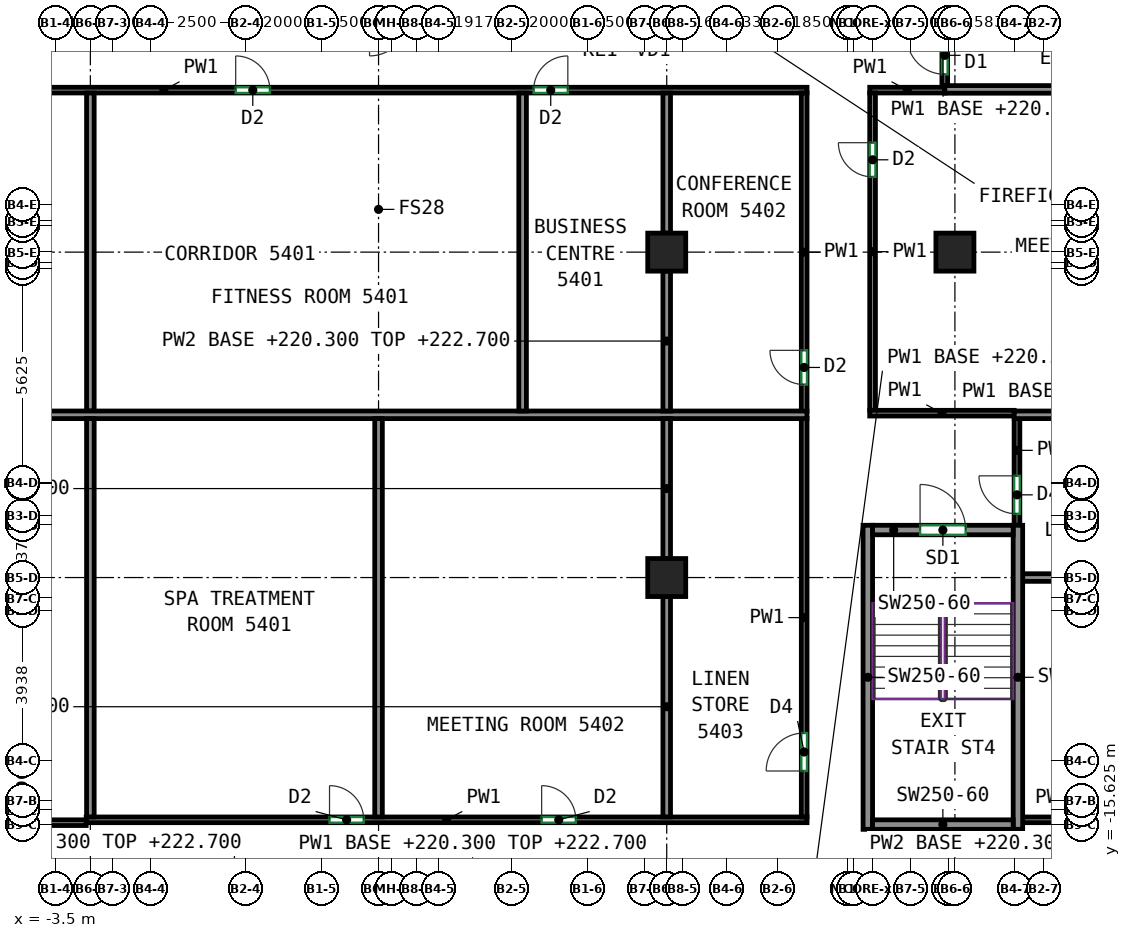
"""IFC4 building model, lengths in metres.
Left out: names, types, materials, properties, quantities, classifications, styles, units other than length and angle.
Written with IfcOpenShell. Run it as: python <this file> out.ifc"""

import sys

from ifc_helpers import new_model, si_unit, direction, frame, frame_2d, origin, origin_2d, place, context, subcontext, project, spatial, rectangle, extrude, source, transform, mapped, element, fill, save


model = new_model("IFC4")
c1 = context("Model", 3, precision=1e-05, world=origin(), true_north=direction((0.0, 1.0)))
c2 = subcontext(c1, "Body", "Model", "MODEL_VIEW")
j1 = project(units=[si_unit("LENGTHUNIT", "METRE"), si_unit("PLANEANGLEUNIT", "RADIAN")], contexts=[c1])
p1 = place(None, origin())
s1 = spatial("IfcSite", under=j1, at=p1, CompositionType="ELEMENT")
p2 = place(p1, origin())
s2 = spatial("IfcBuilding", under=s1, at=p2, CompositionType="ELEMENT")
p3 = place(p2, frame((0.0, 0.0, 220.3)))
s3 = spatial("IfcBuildingStorey", under=s2, at=p3, CompositionType="ELEMENT", Elevation=220.3)
m1 = source(origin(), c2, "Body", "SweptSolid", [
    extrude(rectangle(XDim=1.0, YDim=1.0, at=origin_2d()), origin(), (0.0, 0.0, 1.0), 3.0),
])
for number, where, z_axis, x_axis in (
    (1, (12.583, -9.125, 0.0), (0.0, 0.0, 1.0), (1.0, 0.0, 0.0)),
    (2, (12.583, -0.562, 0.0), (0.0, 0.0, 1.0), (1.0, 0.0, 0.0)),
    (3, (20.167, -0.562, 0.0), (0.0, 0.0, 1.0), (1.0, 0.0, 0.0)),
):
    element("IfcColumn", number, at=place(p3, frame(where, z_axis=z_axis, x_axis=x_axis)), inside=s3, PredefinedType="COLUMN", context=c2, shape_type="MappedRepresentation", body=[
        mapped(m1, transform((0.0, 0.0, 0.0))),
    ])
m2 = source(origin(), c2, "Body", "SweptSolid", [
    extrude(rectangle(XDim=8.0, YDim=0.25, at=frame_2d((4.0, 0.0))), origin(), (0.0, 0.0, 1.0), 3.0),
])
for number, where, z_axis, x_axis in (
    (4, (17.875, -15.75, 0.0), (0.0, 0.0, 1.0), (0.0, 1.0, 0.0)),
    (5, (21.825, -15.75, 0.0), (0.0, 0.0, 1.0), (0.0, 1.0, 0.0)),
):
    element("IfcWall", number, at=place(p3, frame(where, z_axis=z_axis, x_axis=x_axis)), inside=s3, PredefinedType="SHEAR", context=c2, shape_type="MappedRepresentation", body=[
        mapped(m2, transform((0.0, 0.0, 0.0))),
    ])
m3 = source(origin(), c2, "Body", "SweptSolid", [
    extrude(rectangle(XDim=3.7, YDim=0.25, at=frame_2d((1.85, 0.0))), origin(), (0.0, 0.0, 1.0), 3.0),
])
p4 = place(p3, frame((18.0, -15.625, 0.0), z_axis=(0.0, 0.0, 1.0), x_axis=(1.0, 0.0, 0.0)))
e6 = element("IfcWall", 6, at=p4, inside=s3, PredefinedType="SHEAR", context=c2, shape_type="MappedRepresentation", body=[
    mapped(m3, transform((0.0, 0.0, 0.0))),
])
p5 = place(p3, frame((18.0, -7.875, 0.0), z_axis=(0.0, 0.0, 1.0), x_axis=(1.0, 0.0, 0.0)))
e7 = element("IfcWall", 7, at=p5, inside=s3, PredefinedType="SHEAR", context=c2, shape_type="MappedRepresentation", body=[
    mapped(m3, transform((0.0, 0.0, 0.0))),
])
p6 = place(p5, frame((1.25, 0.0, 0.0)))
e8 = element("IfcOpeningElement", 8, at=p6, cuts=e7, PredefinedType="OPENING", context=c2, shape_type="SweptSolid", body=[
    extrude(rectangle(XDim=1.2, YDim=2.1, at=frame_2d((0.6, 1.05))), frame((0.0, 0.135, 0.0), z_axis=(0.0, -1.0, 0.0), x_axis=(1.0, 0.0, 0.0)), (0.0, 0.0, 1.0), 0.27),
])
p7 = place(p3, frame((19.9, 3.809, 0.0), z_axis=(0.0, 0.0, 1.0), x_axis=(0.0, 1.0, 0.0)))
e9 = element("IfcWall", 9, at=p7, inside=s3, PredefinedType="PARTITIONING", context=c2, shape_type="SweptSolid", body=[
    extrude(rectangle(XDim=2.151, YDim=0.15, at=frame_2d((1.075, 0.0))), origin(), (0.0, 0.0, 1.0), 2.4),
])
p8 = place(p7, frame((0.307, 0.0, 0.0)))
e10 = element("IfcOpeningElement", 10, at=p8, cuts=e9, PredefinedType="OPENING", context=c2, shape_type="SweptSolid", body=[
    extrude(rectangle(XDim=1.0, YDim=2.1, at=frame_2d((0.5, 1.05))), frame((0.0, 0.085, 0.0), z_axis=(0.0, -1.0, 0.0), x_axis=(1.0, 0.0, 0.0)), (0.0, 0.0, 1.0), 0.17),
])
p9 = place(p3, frame((17.925, 3.7, 0.0), z_axis=(0.0, 0.0, 1.0), x_axis=(1.0, 0.0, 0.0)))
e11 = element("IfcWall", 11, at=p9, inside=s3, PredefinedType="PARTITIONING", context=c2, shape_type="SweptSolid", body=[
    extrude(rectangle(XDim=1.975, YDim=0.15, at=frame_2d((0.987, 0.0))), origin(), (0.0, 0.0, 1.0), 3.0),
])
p10 = place(p3, frame((18.0, -4.725, 0.0), z_axis=(0.0, 0.0, 1.0), x_axis=(0.0, 1.0, 0.0)))
e12 = element("IfcWall", 12, at=p10, inside=s3, PredefinedType="PARTITIONING", context=c2, shape_type="SweptSolid", body=[
    extrude(rectangle(XDim=8.35, YDim=0.15, at=frame_2d((4.175, 0.0))), origin(), (0.0, 0.0, 1.0), 3.0),
])
p11 = place(p10, frame((6.142, 0.0, 0.0)))
e13 = element("IfcOpeningElement", 13, at=p11, cuts=e12, PredefinedType="OPENING", context=c2, shape_type="SweptSolid", body=[
    extrude(rectangle(XDim=0.9, YDim=2.1, at=frame_2d((0.45, 1.05))), frame((0.0, 0.085, 0.0), z_axis=(0.0, -1.0, 0.0), x_axis=(1.0, 0.0, 0.0)), (0.0, 0.0, 1.0), 0.17),
])
p12 = place(p3, frame((17.925, -4.8, 0.0), z_axis=(0.0, 0.0, 1.0), x_axis=(1.0, 0.0, 0.0)))
e14 = element("IfcWall", 14, at=p12, inside=s3, PredefinedType="PARTITIONING", context=c2, shape_type="SweptSolid", body=[
    extrude(rectangle(XDim=3.802, YDim=0.15, at=frame_2d((1.901, 0.0))), origin(), (0.0, 0.0, 1.0), 3.0),
])
p13 = place(p3, frame((21.8, -7.75, 0.0), z_axis=(0.0, 0.0, 1.0), x_axis=(0.0, 1.0, 0.0)))
e15 = element("IfcWall", 15, at=p13, inside=s3, PredefinedType="PARTITIONING", context=c2, shape_type="SweptSolid", body=[
    extrude(rectangle(XDim=2.817, YDim=0.15, at=frame_2d((1.408, 0.0))), origin(), (0.0, 0.0, 1.0), 3.0),
])
p14 = place(p13, frame((0.301, 0.0, 0.0)))
e16 = element("IfcOpeningElement", 16, at=p14, cuts=e15, PredefinedType="OPENING", context=c2, shape_type="SweptSolid", body=[
    extrude(rectangle(XDim=1.0, YDim=2.1, at=frame_2d((0.5, 1.05))), frame((0.0, 0.085, 0.0), z_axis=(0.0, -1.0, 0.0), x_axis=(1.0, 0.0, 0.0)), (0.0, 0.0, 1.0), 0.17),
])
p15 = place(p3, frame((21.95, -15.5, 0.0), z_axis=(0.0, 0.0, 1.0), x_axis=(1.0, 0.0, 0.0)))
e17 = element("IfcWall", 17, at=p15, inside=s3, PredefinedType="PARTITIONING", context=c2, shape_type="SweptSolid", body=[
    extrude(rectangle(XDim=5.875, YDim=0.15, at=frame_2d((2.938, 0.0))), origin(), (0.0, 0.0, 1.0), 3.0),
])
p16 = place(p15, frame((2.437, 0.0, 0.0)))
e18 = element("IfcOpeningElement", 18, at=p16, cuts=e17, PredefinedType="OPENING", context=c2, shape_type="SweptSolid", body=[
    extrude(rectangle(XDim=0.9, YDim=2.1, at=frame_2d((0.45, 1.05))), frame((0.0, 0.085, 0.0), z_axis=(0.0, -1.0, 0.0), x_axis=(1.0, 0.0, 0.0)), (0.0, 0.0, 1.0), 0.17),
])
p17 = place(p3, frame((-17.575, 3.7, 0.0), z_axis=(0.0, 0.0, 1.0), x_axis=(1.0, 0.0, 0.0)))
e19 = element("IfcWall", 19, at=p17, inside=s3, PredefinedType="PARTITIONING", context=c2, shape_type="SweptSolid", body=[
    extrude(rectangle(XDim=33.85, YDim=0.15, at=frame_2d((16.925, 0.0))), origin(), (0.0, 0.0, 1.0), 3.0),
])
p18 = place(p17, frame((4.301, 0.0, 0.0)))
e20 = element("IfcOpeningElement", 20, at=p18, cuts=e19, PredefinedType="OPENING", context=c2, shape_type="SweptSolid", body=[
    extrude(rectangle(XDim=0.9, YDim=2.1, at=frame_2d((0.45, 1.05))), frame((0.0, 0.085, 0.0), z_axis=(0.0, -1.0, 0.0), x_axis=(1.0, 0.0, 0.0)), (0.0, 0.0, 1.0), 0.17),
])
p19 = place(p17, frame((18.816, 0.0, 0.0)))
e21 = element("IfcOpeningElement", 21, at=p19, cuts=e19, PredefinedType="OPENING", context=c2, shape_type="SweptSolid", body=[
    extrude(rectangle(XDim=0.9, YDim=2.1, at=frame_2d((0.45, 1.05))), frame((0.0, 0.085, 0.0), z_axis=(0.0, -1.0, 0.0), x_axis=(1.0, 0.0, 0.0)), (0.0, 0.0, 1.0), 0.17),
])
p20 = place(p17, frame((26.656, 0.0, 0.0)))
e22 = element("IfcOpeningElement", 22, at=p20, cuts=e19, PredefinedType="OPENING", context=c2, shape_type="SweptSolid", body=[
    extrude(rectangle(XDim=0.9, YDim=2.1, at=frame_2d((0.45, 1.05))), frame((0.0, 0.085, 0.0), z_axis=(0.0, -1.0, 0.0), x_axis=(1.0, 0.0, 0.0)), (0.0, 0.0, 1.0), 0.17),
])
p21 = place(p3, frame((16.2, -4.753, 0.0), z_axis=(0.0, 0.0, 1.0), x_axis=(0.0, 1.0, 0.0)))
e23 = element("IfcWall", 23, at=p21, inside=s3, PredefinedType="PARTITIONING", context=c2, shape_type="SweptSolid", body=[
    extrude(rectangle(XDim=8.378, YDim=0.15, at=frame_2d((4.189, 0.0))), origin(), (0.0, 0.0, 1.0), 3.0),
])
p22 = place(p21, frame((0.706, 0.0, 0.0)))
e24 = element("IfcOpeningElement", 24, at=p22, cuts=e23, PredefinedType="OPENING", context=c2, shape_type="SweptSolid", body=[
    extrude(rectangle(XDim=0.9, YDim=2.1, at=frame_2d((0.45, 1.05))), frame((0.0, 0.085, 0.0), z_axis=(0.0, -1.0, 0.0), x_axis=(1.0, 0.0, 0.0)), (0.0, 0.0, 1.0), 0.17),
])
p23 = place(p3, frame((-2.693, -15.575, 0.0), z_axis=(0.0, 0.0, 1.0), x_axis=(-1.0, 0.0, 0.0)))
e25 = element("IfcWall", 25, at=p23, inside=s3, PredefinedType="PARTITIONING", context=c2, shape_type="SweptSolid", body=[
    extrude(rectangle(XDim=10.857, YDim=0.15, at=frame_2d((5.428, 0.0))), origin(), (0.0, 0.0, 1.0), 3.0),
])
p24 = place(p23, frame((8.75, 0.0, 0.0)))
e26 = element("IfcOpeningElement", 26, at=p24, cuts=e25, PredefinedType="OPENING", context=c2, shape_type="SweptSolid", body=[
    extrude(rectangle(XDim=1.0, YDim=2.1, at=frame_2d((0.5, 1.05))), frame((0.0, 0.085, 0.0), z_axis=(0.0, -1.0, 0.0), x_axis=(1.0, 0.0, 0.0)), (0.0, 0.0, 1.0), 0.17),
])
p25 = place(p3, frame((-2.693, -15.5, 0.0), z_axis=(0.0, 0.0, 1.0), x_axis=(1.0, 0.0, 0.0)))
e27 = element("IfcWall", 27, at=p25, inside=s3, PredefinedType="PARTITIONING", context=c2, shape_type="SweptSolid", body=[
    extrude(rectangle(XDim=18.968, YDim=0.15, at=frame_2d((9.484, 0.0))), origin(), (0.0, 0.0, 1.0), 3.0),
])
p26 = place(p25, frame((6.403, 0.0, 0.0)))
e28 = element("IfcOpeningElement", 28, at=p26, cuts=e27, PredefinedType="OPENING", context=c2, shape_type="SweptSolid", body=[
    extrude(rectangle(XDim=0.9, YDim=2.1, at=frame_2d((0.45, 1.05))), frame((0.0, 0.085, 0.0), z_axis=(0.0, -1.0, 0.0), x_axis=(1.0, 0.0, 0.0)), (0.0, 0.0, 1.0), 0.17),
])
p27 = place(p25, frame((11.985, 0.0, 0.0)))
e29 = element("IfcOpeningElement", 29, at=p27, cuts=e27, PredefinedType="OPENING", context=c2, shape_type="SweptSolid", body=[
    extrude(rectangle(XDim=0.9, YDim=2.1, at=frame_2d((0.45, 1.05))), frame((0.0, 0.085, 0.0), z_axis=(0.0, -1.0, 0.0), x_axis=(1.0, 0.0, 0.0)), (0.0, 0.0, 1.0), 0.17),
])
p28 = place(p3, frame((16.2, -15.425, 0.0), z_axis=(0.0, 0.0, 1.0), x_axis=(0.0, 1.0, 0.0)))
e30 = element("IfcWall", 30, at=p28, inside=s3, PredefinedType="PARTITIONING", context=c2, shape_type="SweptSolid", body=[
    extrude(rectangle(XDim=10.492, YDim=0.15, at=frame_2d((5.246, 0.0))), origin(), (0.0, 0.0, 1.0), 3.0),
])
p29 = place(p28, frame((1.21, 0.0, 0.0)))
e31 = element("IfcOpeningElement", 31, at=p29, cuts=e30, PredefinedType="OPENING", context=c2, shape_type="SweptSolid", body=[
    extrude(rectangle(XDim=1.0, YDim=2.1, at=frame_2d((0.5, 1.05))), frame((0.0, 0.085, 0.0), z_axis=(0.0, -1.0, 0.0), x_axis=(1.0, 0.0, 0.0)), (0.0, 0.0, 1.0), 0.17),
])
p30 = place(p3, frame((19.902, 3.719, 0.0), z_axis=(0.0, 0.0, 1.0), x_axis=(1.0, 0.0, 0.0)))
e32 = element("IfcWall", 32, at=p30, inside=s3, PredefinedType="PARTITIONING", context=c2, shape_type="SweptSolid", body=[
    extrude(rectangle(XDim=11.098, YDim=0.2, at=frame_2d((5.549, 0.0))), origin(), (0.0, 0.0, 1.0), 3.0),
])
p31 = place(p3, frame((21.727, -4.843, 0.0), z_axis=(0.0, 0.0, 1.0), x_axis=(1.0, 0.0, 0.0)))
e33 = element("IfcWall", 33, at=p31, inside=s3, PredefinedType="PARTITIONING", context=c2, shape_type="SweptSolid", body=[
    extrude(rectangle(XDim=9.273, YDim=0.2, at=frame_2d((4.636, 0.0))), origin(), (0.0, 0.0, 1.0), 3.0),
])
p32 = place(p3, frame((21.95, -9.125, 0.0), z_axis=(0.0, 0.0, 1.0), x_axis=(1.0, 0.0, 0.0)))
e34 = element("IfcWall", 34, at=p32, inside=s3, PredefinedType="PARTITIONING", context=c2, shape_type="SweptSolid", body=[
    extrude(rectangle(XDim=8.475, YDim=0.2, at=frame_2d((4.238, 0.0))), origin(), (0.0, 0.0, 1.0), 3.0),
])
p33 = place(p3, frame((-2.583, -4.743, 0.0), z_axis=(0.0, 0.0, 1.0), x_axis=(0.0, 1.0, 0.0)))
e35 = element("IfcWall", 35, at=p33, inside=s3, PredefinedType="PARTITIONING", context=c2, shape_type="SweptSolid", body=[
    extrude(rectangle(XDim=8.366, YDim=0.2, at=frame_2d((4.183, 0.0))), origin(), (0.0, 0.0, 1.0), 3.0),
])
p34 = place(p3, frame((-13.873, -4.843, 0.0), z_axis=(0.0, 0.0, 1.0), x_axis=(1.0, 0.0, 0.0)))
e36 = element("IfcWall", 36, at=p34, inside=s3, PredefinedType="PARTITIONING", context=c2, shape_type="SweptSolid", body=[
    extrude(rectangle(XDim=30.146, YDim=0.2, at=frame_2d((15.073, 0.0))), origin(), (0.0, 0.0, 1.0), 3.0),
])
p35 = place(p3, frame((8.791, -4.743, 0.0), z_axis=(0.0, 0.0, 1.0), x_axis=(0.0, 1.0, 0.0)))
e37 = element("IfcWall", 37, at=p35, inside=s3, PredefinedType="PARTITIONING", context=c2, shape_type="SweptSolid", body=[
    extrude(rectangle(XDim=8.366, YDim=0.2, at=frame_2d((4.183, 0.0))), origin(), (0.0, 0.0, 1.0), 3.0),
])
p36 = place(p3, frame((12.583, -0.062, 0.0), z_axis=(0.0, 0.0, 1.0), x_axis=(0.0, 1.0, 0.0)))
e38 = element("IfcWall", 38, at=p36, inside=s3, PredefinedType="PARTITIONING", context=c2, shape_type="SweptSolid", body=[
    extrude(rectangle(XDim=3.685, YDim=0.2, at=frame_2d((1.843, 0.0))), origin(), (0.0, 0.0, 1.0), 3.0),
])
p37 = place(p3, frame((12.583, -4.743, 0.0), z_axis=(0.0, 0.0, 1.0), x_axis=(0.0, 1.0, 0.0)))
e39 = element("IfcWall", 39, at=p37, inside=s3, PredefinedType="PARTITIONING", context=c2, shape_type="SweptSolid", body=[
    extrude(rectangle(XDim=3.681, YDim=0.2, at=frame_2d((1.84, 0.0))), origin(), (0.0, 0.0, 1.0), 2.4),
])
for number, where, z_axis, x_axis in (
    (40, (-2.583, -15.423, 0.0), (0.0, 0.0, 1.0), (0.0, 1.0, 0.0)),
    (41, (5.0, -15.423, 0.0), (0.0, 0.0, 1.0), (0.0, 1.0, 0.0)),
):
    element("IfcWall", number, at=place(p3, frame(where, z_axis=z_axis, x_axis=x_axis)), inside=s3, PredefinedType="PARTITIONING", context=c2, shape_type="SweptSolid", body=[
        extrude(rectangle(XDim=10.48, YDim=0.2, at=frame_2d((5.24, 0.0))), origin(), (0.0, 0.0, 1.0), 3.0),
    ])
p38 = place(p3, frame((12.583, -8.625, 0.0), z_axis=(0.0, 0.0, 1.0), x_axis=(0.0, 1.0, 0.0)))
e42 = element("IfcWall", 42, at=p38, inside=s3, PredefinedType="PARTITIONING", context=c2, shape_type="SweptSolid", body=[
    extrude(rectangle(XDim=3.682, YDim=0.2, at=frame_2d((1.841, 0.0))), origin(), (0.0, 0.0, 1.0), 2.4),
])
p39 = place(p3, frame((12.583, -15.423, 0.0), z_axis=(0.0, 0.0, 1.0), x_axis=(0.0, 1.0, 0.0)))
e43 = element("IfcWall", 43, at=p39, inside=s3, PredefinedType="PARTITIONING", context=c2, shape_type="SweptSolid", body=[
    extrude(rectangle(XDim=5.798, YDim=0.2, at=frame_2d((2.899, 0.0))), origin(), (0.0, 0.0, 1.0), 2.4),
])
p40 = place(p6, origin())
e44 = element("IfcDoor", 44, at=p40, inside=s3, OperationType="DOUBLE_DOOR_SINGLE_SWING", PredefinedType="DOOR", context=c2, shape_type="SweptSolid", body=[
    extrude(rectangle(XDim=1.2, YDim=2.1, at=frame_2d((0.6, 1.05))), frame((0.0, 0.025, 0.0), z_axis=(0.0, -1.0, 0.0), x_axis=(1.0, 0.0, 0.0)), (0.0, 0.0, 1.0), 0.05),
])
fill(e8, e44)
p41 = place(p26, origin())
e45 = element("IfcDoor", 45, at=p41, inside=s3, OperationType="SINGLE_SWING_LEFT", PredefinedType="DOOR", context=c2, shape_type="SweptSolid", body=[
    extrude(rectangle(XDim=0.9, YDim=2.1, at=frame_2d((0.45, 1.05))), frame((0.0, 0.025, 0.0), z_axis=(0.0, -1.0, 0.0), x_axis=(1.0, 0.0, 0.0)), (0.0, 0.0, 1.0), 0.05),
])
fill(e28, e45)
p42 = place(p27, origin())
e46 = element("IfcDoor", 46, at=p42, inside=s3, OperationType="SINGLE_SWING_LEFT", PredefinedType="DOOR", context=c2, shape_type="SweptSolid", body=[
    extrude(rectangle(XDim=0.9, YDim=2.1, at=frame_2d((0.45, 1.05))), frame((0.0, 0.025, 0.0), z_axis=(0.0, -1.0, 0.0), x_axis=(1.0, 0.0, 0.0)), (0.0, 0.0, 1.0), 0.05),
])
fill(e29, e46)
p43 = place(p29, origin())
e47 = element("IfcDoor", 47, at=p43, inside=s3, OperationType="SINGLE_SWING_LEFT", PredefinedType="DOOR", context=c2, shape_type="SweptSolid", body=[
    extrude(rectangle(XDim=1.0, YDim=2.1, at=frame_2d((0.5, 1.05))), frame((0.0, 0.025, 0.0), z_axis=(0.0, -1.0, 0.0), x_axis=(1.0, 0.0, 0.0)), (0.0, 0.0, 1.0), 0.05),
])
fill(e31, e47)
p44 = place(p14, origin())
e48 = element("IfcDoor", 48, at=p44, inside=s3, OperationType="SINGLE_SWING_RIGHT", PredefinedType="DOOR", context=c2, shape_type="SweptSolid", body=[
    extrude(rectangle(XDim=1.0, YDim=2.1, at=frame_2d((0.5, 1.05))), frame((0.0, 0.025, 0.0), z_axis=(0.0, -1.0, 0.0), x_axis=(1.0, 0.0, 0.0)), (0.0, 0.0, 1.0), 0.05),
])
fill(e16, e48)
p45 = place(p22, origin())
e49 = element("IfcDoor", 49, at=p45, inside=s3, OperationType="SINGLE_SWING_RIGHT", PredefinedType="DOOR", context=c2, shape_type="SweptSolid", body=[
    extrude(rectangle(XDim=0.9, YDim=2.1, at=frame_2d((0.45, 1.05))), frame((0.0, 0.025, 0.0), z_axis=(0.0, -1.0, 0.0), x_axis=(1.0, 0.0, 0.0)), (0.0, 0.0, 1.0), 0.05),
])
fill(e24, e49)
p46 = place(p11, origin())
e50 = element("IfcDoor", 50, at=p46, inside=s3, OperationType="SINGLE_SWING_RIGHT", PredefinedType="DOOR", context=c2, shape_type="SweptSolid", body=[
    extrude(rectangle(XDim=0.9, YDim=2.1, at=frame_2d((0.45, 1.05))), frame((0.0, 0.025, 0.0), z_axis=(0.0, -1.0, 0.0), x_axis=(1.0, 0.0, 0.0)), (0.0, 0.0, 1.0), 0.05),
])
fill(e13, e50)
p47 = place(p19, origin())
e51 = element("IfcDoor", 51, at=p47, inside=s3, OperationType="SINGLE_SWING_LEFT", PredefinedType="DOOR", context=c2, shape_type="SweptSolid", body=[
    extrude(rectangle(XDim=0.9, YDim=2.1, at=frame_2d((0.45, 1.05))), frame((0.0, 0.025, 0.0), z_axis=(0.0, -1.0, 0.0), x_axis=(1.0, 0.0, 0.0)), (0.0, 0.0, 1.0), 0.05),
])
fill(e21, e51)
p48 = place(p20, origin())
e52 = element("IfcDoor", 52, at=p48, inside=s3, OperationType="SINGLE_SWING_RIGHT", PredefinedType="DOOR", context=c2, shape_type="SweptSolid", body=[
    extrude(rectangle(XDim=0.9, YDim=2.1, at=frame_2d((0.45, 1.05))), frame((0.0, 0.025, 0.0), z_axis=(0.0, -1.0, 0.0), x_axis=(1.0, 0.0, 0.0)), (0.0, 0.0, 1.0), 0.05),
])
fill(e22, e52)
p49 = place(p8, origin())
e53 = element("IfcDoor", 53, at=p49, inside=s3, OperationType="SINGLE_SWING_RIGHT", PredefinedType="DOOR", context=c2, shape_type="SweptSolid", body=[
    extrude(rectangle(XDim=1.0, YDim=2.1, at=frame_2d((0.5, 1.05))), frame((0.0, 0.025, 0.0), z_axis=(0.0, -1.0, 0.0), x_axis=(1.0, 0.0, 0.0)), (0.0, 0.0, 1.0), 0.05),
])
fill(e10, e53)
save(model, sys.argv[1])
